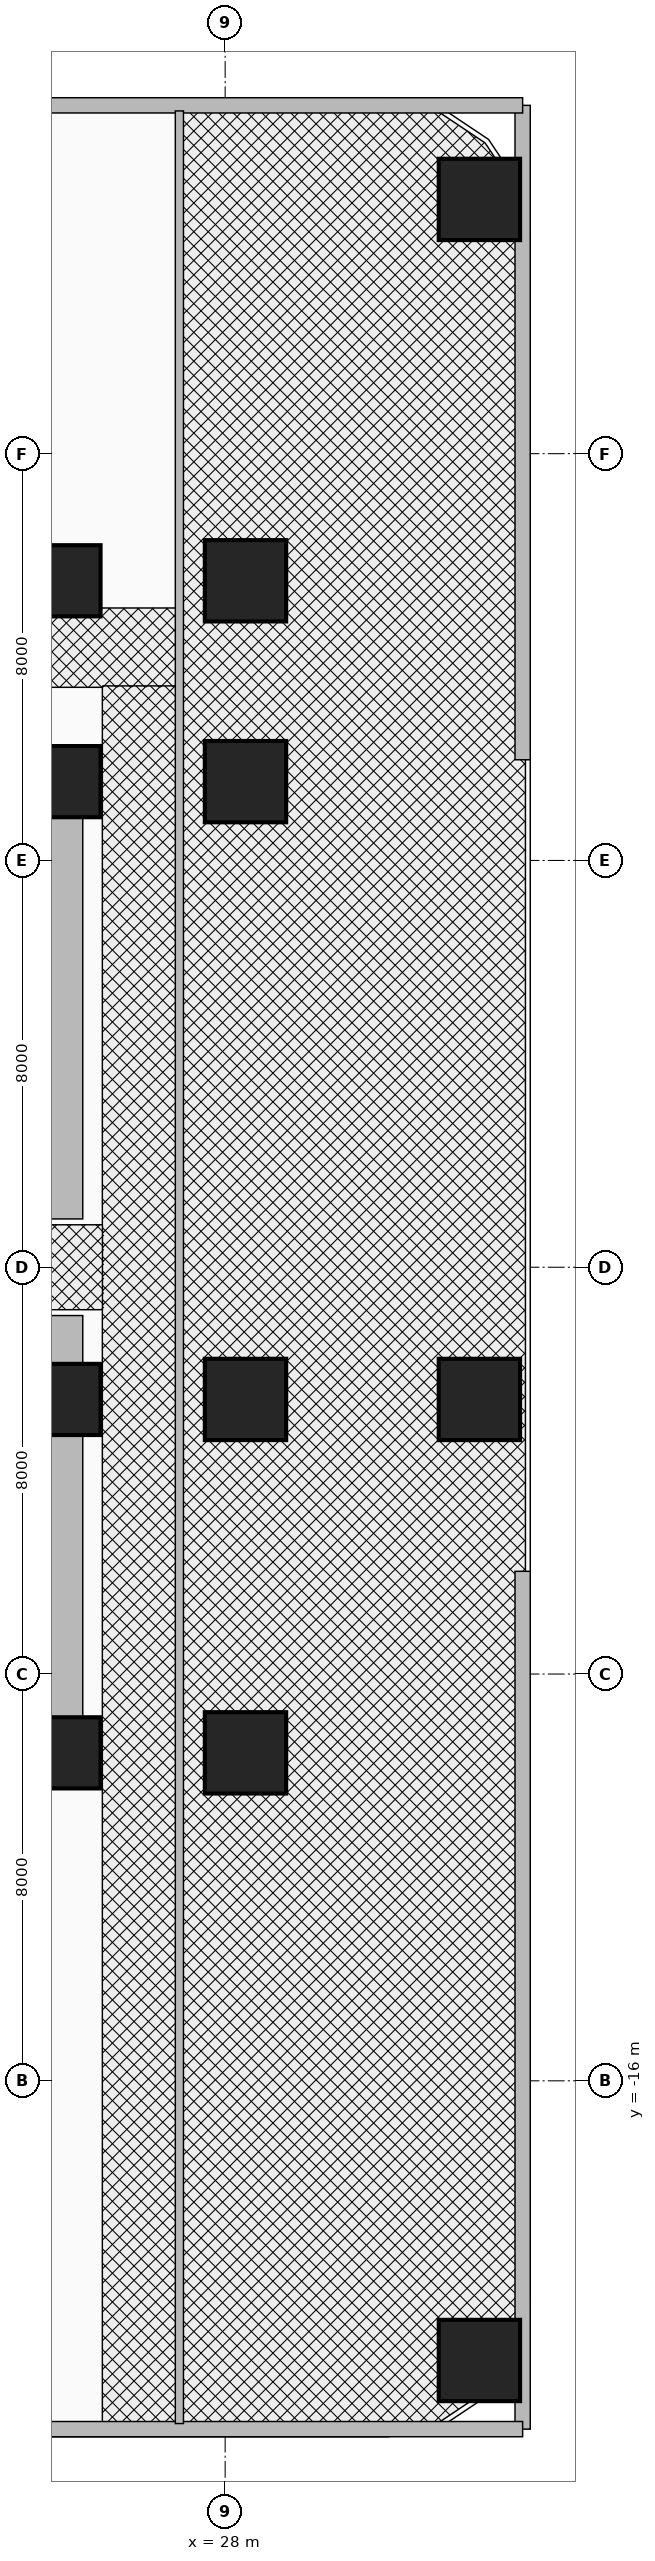
"""IFC4 building model, lengths in metres.
Left out: names, types, materials, properties, quantities, classifications, styles, units other than length and angle.
Written with IfcOpenShell. Run it as: python <this file> out.ifc"""

import sys

from ifc_helpers import new_model, si_unit, direction, frame, frame_2d, origin, origin_2d, place, context, subcontext, project, spatial, rectangle, extrude, source, transform, mapped, element, fill, save


model = new_model("IFC4")
c1 = context("Model", 3, precision=1e-05, world=origin(), true_north=direction((0.0, 1.0)))
c2 = subcontext(c1, "Body", "Model", "MODEL_VIEW")
j1 = project(units=[si_unit("LENGTHUNIT", "METRE"), si_unit("PLANEANGLEUNIT", "RADIAN")], contexts=[c1])
p1 = place(None, origin())
s1 = spatial("IfcSite", under=j1, at=p1, CompositionType="ELEMENT")
p2 = place(p1, origin())
s2 = spatial("IfcBuilding", under=s1, at=p2, CompositionType="ELEMENT")
p3 = place(p2, frame((0.0, 0.0, 10.4)))
s3 = spatial("IfcBuildingStorey", under=s2, at=p3, CompositionType="ELEMENT", Elevation=10.4)
for number, where, z_axis, x_axis in (
    (1, (24.85, -9.9, 0.0), (0.0, 0.0, 1.0), (0.0, 1.0, 0.0)),
    (2, (24.85, 0.95, 0.0), (0.0, 0.0, 1.0), (0.0, 1.0, 0.0)),
):
    element("IfcWall", number, at=place(p3, frame(where, z_axis=z_axis, x_axis=x_axis)), inside=s3, PredefinedType="SHEAR", context=c2, shape_type="SweptSolid", body=[
        extrude(rectangle(XDim=8.95, YDim=0.7, at=frame_2d((4.475, 0.0))), origin(), (0.0, 0.0, 1.0), 4.92),
    ])
for number, where, z_axis, x_axis in (
    (3, (15.85, 9.55, 0.0), (0.0, 0.0, 1.0), (1.0, 0.0, 0.0)),
    (4, (15.85, -9.55, 0.0), (0.0, 0.0, 1.0), (1.0, 0.0, 0.0)),
):
    element("IfcWall", number, at=place(p3, frame(where, z_axis=z_axis, x_axis=x_axis)), inside=s3, PredefinedType="SHEAR", context=c2, shape_type="SweptSolid", body=[
        extrude(rectangle(XDim=9.0, YDim=0.7, at=frame_2d((4.5, 0.0))), origin(), (0.0, 0.0, 1.0), 4.92),
    ])
m1 = source(origin(), c2, "Body", "SweptSolid", [
    extrude(rectangle(XDim=1.4, YDim=1.4, at=origin_2d()), origin(), (0.0, 0.0, 1.0), 5.2),
])
p4 = place(p3, frame((24.85, -9.55, 0.0), z_axis=(0.0, 0.0, 1.0), x_axis=(1.0, 0.0, 0.0)))
e5 = element("IfcColumn", 5, at=p4, inside=s3, PredefinedType="COLUMN", context=c2, shape_type="MappedRepresentation", body=[
    mapped(m1, transform((0.0, 0.0, 0.0), x_axis=(1.0, 0.0, 0.0), y_axis=(0.0, 1.0, 0.0), z_axis=(0.0, 0.0, 1.0), scale=1.0)),
])
m2 = source(origin(), c2, "Body", "SweptSolid", [
    extrude(rectangle(XDim=1.6, YDim=1.6, at=origin_2d()), origin(), (0.0, 0.0, 1.0), 5.2),
])
p5 = place(p3, frame((28.4, -9.55, 0.0), z_axis=(0.0, 0.0, 1.0), x_axis=(1.0, 0.0, 0.0)))
e6 = element("IfcColumn", 6, at=p5, inside=s3, PredefinedType="COLUMN", context=c2, shape_type="MappedRepresentation", body=[
    mapped(m2, transform((0.0, 0.0, 0.0), x_axis=(1.0, 0.0, 0.0), y_axis=(0.0, 1.0, 0.0), z_axis=(0.0, 0.0, 1.0), scale=1.0)),
])
p6 = place(p3, frame((24.85, -2.6, 0.0), z_axis=(0.0, 0.0, 1.0), x_axis=(1.0, 0.0, 0.0)))
e7 = element("IfcColumn", 7, at=p6, inside=s3, PredefinedType="COLUMN", context=c2, shape_type="MappedRepresentation", body=[
    mapped(m1, transform((0.0, 0.0, 0.0), x_axis=(1.0, 0.0, 0.0), y_axis=(0.0, 1.0, 0.0), z_axis=(0.0, 0.0, 1.0), scale=1.0)),
])
p7 = place(p3, frame((28.4, -2.6, 0.0), z_axis=(0.0, 0.0, 1.0), x_axis=(1.0, 0.0, 0.0)))
e8 = element("IfcColumn", 8, at=p7, inside=s3, PredefinedType="COLUMN", context=c2, shape_type="MappedRepresentation", body=[
    mapped(m2, transform((0.0, 0.0, 0.0), x_axis=(1.0, 0.0, 0.0), y_axis=(0.0, 1.0, 0.0), z_axis=(0.0, 0.0, 1.0), scale=1.0)),
])
p8 = place(p3, frame((24.85, 9.55, 0.0), z_axis=(0.0, 0.0, 1.0), x_axis=(1.0, 0.0, 0.0)))
e9 = element("IfcColumn", 9, at=p8, inside=s3, PredefinedType="COLUMN", context=c2, shape_type="MappedRepresentation", body=[
    mapped(m1, transform((0.0, 0.0, 0.0), x_axis=(1.0, 0.0, 0.0), y_axis=(0.0, 1.0, 0.0), z_axis=(0.0, 0.0, 1.0), scale=1.0)),
])
p9 = place(p3, frame((28.4, 9.55, 0.0), z_axis=(0.0, 0.0, 1.0), x_axis=(1.0, 0.0, 0.0)))
e10 = element("IfcColumn", 10, at=p9, inside=s3, PredefinedType="COLUMN", context=c2, shape_type="MappedRepresentation", body=[
    mapped(m2, transform((0.0, 0.0, 0.0), x_axis=(1.0, 0.0, 0.0), y_axis=(0.0, 1.0, 0.0), z_axis=(0.0, 0.0, 1.0), scale=1.0)),
])
p10 = place(p3, frame((24.85, 13.5, 0.0), z_axis=(0.0, 0.0, 1.0), x_axis=(1.0, 0.0, 0.0)))
e11 = element("IfcColumn", 11, at=p10, inside=s3, PredefinedType="COLUMN", context=c2, shape_type="MappedRepresentation", body=[
    mapped(m1, transform((0.0, 0.0, 0.0), x_axis=(1.0, 0.0, 0.0), y_axis=(0.0, 1.0, 0.0), z_axis=(0.0, 0.0, 1.0), scale=1.0)),
])
for number, where, z_axis, x_axis in (
    (12, (28.4, 13.5, 0.0), (0.0, 0.0, 1.0), (1.0, 0.0, 0.0)),
    (13, (33.0, 21.0, 0.0), (0.0, 0.0, 1.0), (1.0, 0.0, 0.0)),
    (14, (33.0, -2.6, 0.0), (0.0, 0.0, 1.0), (1.0, 0.0, 0.0)),
    (15, (33.0, -21.5, 0.0), (0.0, 0.0, 1.0), (1.0, 0.0, 0.0)),
):
    element("IfcColumn", number, at=place(p3, frame(where, z_axis=z_axis, x_axis=x_axis)), inside=s3, PredefinedType="COLUMN", context=c2, shape_type="MappedRepresentation", body=[
        mapped(m2, transform((0.0, 0.0, 0.0), x_axis=(1.0, 0.0, 0.0), y_axis=(0.0, 1.0, 0.0), z_axis=(0.0, 0.0, 1.0), scale=1.0)),
    ])
p11 = place(p3, frame((33.85, -22.85, 0.0), z_axis=(0.0, 0.0, 1.0), x_axis=(0.0, 1.0, 0.0)))
e16 = element("IfcWall", 16, at=p11, inside=s3, PredefinedType="SOLIDWALL", context=c2, shape_type="SweptSolid", body=[
    extrude(rectangle(XDim=16.87, YDim=0.3, at=frame_2d((8.435, 0.0))), origin(), (0.0, 0.0, 1.0), 4.92),
])
p12 = place(p11, frame((3.0, 0.0, 0.9)))
e17 = element("IfcOpeningElement", 17, at=p12, cuts=e16, PredefinedType="OPENING", context=c2, shape_type="SweptSolid", body=[
    extrude(rectangle(XDim=1.5, YDim=1.75, at=frame_2d((0.75, 0.875))), frame((0.0, 0.165, 0.0), z_axis=(0.0, -1.0, 0.0), x_axis=(1.0, 0.0, 0.0)), (0.0, 0.0, 1.0), 0.33),
])
p13 = place(p11, frame((8.2, 0.0, 0.9)))
e18 = element("IfcOpeningElement", 18, at=p13, cuts=e16, PredefinedType="OPENING", context=c2, shape_type="SweptSolid", body=[
    extrude(rectangle(XDim=1.5, YDim=1.75, at=frame_2d((0.75, 0.875))), frame((0.0, 0.165, 0.0), z_axis=(0.0, -1.0, 0.0), x_axis=(1.0, 0.0, 0.0)), (0.0, 0.0, 1.0), 0.33),
])
p14 = place(p11, frame((13.4, 0.0, 0.9)))
e19 = element("IfcOpeningElement", 19, at=p14, cuts=e16, PredefinedType="OPENING", context=c2, shape_type="SweptSolid", body=[
    extrude(rectangle(XDim=1.5, YDim=1.75, at=frame_2d((0.75, 0.875))), frame((0.0, 0.165, 0.0), z_axis=(0.0, -1.0, 0.0), x_axis=(1.0, 0.0, 0.0)), (0.0, 0.0, 1.0), 0.33),
])
p15 = place(p3, frame((33.85, 9.98, 0.0), z_axis=(0.0, 0.0, 1.0), x_axis=(0.0, 1.0, 0.0)))
e20 = element("IfcWall", 20, at=p15, inside=s3, PredefinedType="SOLIDWALL", context=c2, shape_type="SweptSolid", body=[
    extrude(rectangle(XDim=12.87, YDim=0.3, at=frame_2d((6.435, 0.0))), origin(), (0.0, 0.0, 1.0), 4.92),
])
p16 = place(p15, frame((3.0, 0.0, 0.9)))
e21 = element("IfcOpeningElement", 21, at=p16, cuts=e20, PredefinedType="OPENING", context=c2, shape_type="SweptSolid", body=[
    extrude(rectangle(XDim=1.5, YDim=1.75, at=frame_2d((0.75, 0.875))), frame((0.0, 0.165, 0.0), z_axis=(0.0, -1.0, 0.0), x_axis=(1.0, 0.0, 0.0)), (0.0, 0.0, 1.0), 0.33),
])
p17 = place(p15, frame((8.2, 0.0, 0.9)))
e22 = element("IfcOpeningElement", 22, at=p17, cuts=e20, PredefinedType="OPENING", context=c2, shape_type="SweptSolid", body=[
    extrude(rectangle(XDim=1.5, YDim=1.75, at=frame_2d((0.75, 0.875))), frame((0.0, 0.165, 0.0), z_axis=(0.0, -1.0, 0.0), x_axis=(1.0, 0.0, 0.0)), (0.0, 0.0, 1.0), 0.33),
])
p18 = place(p3, frame((12.15, -22.85, 0.0), z_axis=(0.0, 0.0, 1.0), x_axis=(1.0, 0.0, 0.0)))
e23 = element("IfcWall", 23, at=p18, inside=s3, PredefinedType="SOLIDWALL", context=c2, shape_type="SweptSolid", body=[
    extrude(rectangle(XDim=21.7, YDim=0.3, at=frame_2d((10.85, 0.0))), origin(), (0.0, 0.0, 1.0), 4.92),
])
p19 = place(p18, frame((3.2, 0.0, 0.9)))
e24 = element("IfcOpeningElement", 24, at=p19, cuts=e23, PredefinedType="OPENING", context=c2, shape_type="SweptSolid", body=[
    extrude(rectangle(XDim=1.5, YDim=1.75, at=frame_2d((0.75, 0.875))), frame((0.0, 0.165, 0.0), z_axis=(0.0, -1.0, 0.0), x_axis=(1.0, 0.0, 0.0)), (0.0, 0.0, 1.0), 0.33),
])
p20 = place(p18, frame((9.8, 0.0, 0.9)))
e25 = element("IfcOpeningElement", 25, at=p20, cuts=e23, PredefinedType="OPENING", context=c2, shape_type="SweptSolid", body=[
    extrude(rectangle(XDim=1.5, YDim=1.75, at=frame_2d((0.75, 0.875))), frame((0.0, 0.165, 0.0), z_axis=(0.0, -1.0, 0.0), x_axis=(1.0, 0.0, 0.0)), (0.0, 0.0, 1.0), 0.33),
])
p21 = place(p18, frame((17.6, 0.0, 0.9)))
e26 = element("IfcOpeningElement", 26, at=p21, cuts=e23, PredefinedType="OPENING", context=c2, shape_type="SweptSolid", body=[
    extrude(rectangle(XDim=1.5, YDim=1.75, at=frame_2d((0.75, 0.875))), frame((0.0, 0.165, 0.0), z_axis=(0.0, -1.0, 0.0), x_axis=(1.0, 0.0, 0.0)), (0.0, 0.0, 1.0), 0.33),
])
p22 = place(p3, frame((9.98, 22.85, 0.0), z_axis=(0.0, 0.0, 1.0), x_axis=(1.0, 0.0, 0.0)))
e27 = element("IfcWall", 27, at=p22, inside=s3, PredefinedType="SOLIDWALL", context=c2, shape_type="SweptSolid", body=[
    extrude(rectangle(XDim=23.87, YDim=0.3, at=frame_2d((11.935, 0.0))), origin(), (0.0, 0.0, 1.0), 4.92),
])
p23 = place(p22, frame((3.2, 0.0, 0.9)))
e28 = element("IfcOpeningElement", 28, at=p23, cuts=e27, PredefinedType="OPENING", context=c2, shape_type="SweptSolid", body=[
    extrude(rectangle(XDim=1.5, YDim=1.75, at=frame_2d((0.75, 0.875))), frame((0.0, 0.165, 0.0), z_axis=(0.0, -1.0, 0.0), x_axis=(1.0, 0.0, 0.0)), (0.0, 0.0, 1.0), 0.33),
])
p24 = place(p22, frame((10.0, 0.0, 0.9)))
e29 = element("IfcOpeningElement", 29, at=p24, cuts=e27, PredefinedType="OPENING", context=c2, shape_type="SweptSolid", body=[
    extrude(rectangle(XDim=1.5, YDim=1.75, at=frame_2d((0.75, 0.875))), frame((0.0, 0.165, 0.0), z_axis=(0.0, -1.0, 0.0), x_axis=(1.0, 0.0, 0.0)), (0.0, 0.0, 1.0), 0.33),
])
p25 = place(p22, frame((17.8, 0.0, 0.9)))
e30 = element("IfcOpeningElement", 30, at=p25, cuts=e27, PredefinedType="OPENING", context=c2, shape_type="SweptSolid", body=[
    extrude(rectangle(XDim=1.5, YDim=1.75, at=frame_2d((0.75, 0.875))), frame((0.0, 0.165, 0.0), z_axis=(0.0, -1.0, 0.0), x_axis=(1.0, 0.0, 0.0)), (0.0, 0.0, 1.0), 0.33),
])
p26 = place(p3, frame((27.1, -22.74, 0.0), z_axis=(0.0, 0.0, 1.0), x_axis=(0.0, 1.0, 0.0)))
e31 = element("IfcWall", 31, at=p26, inside=s3, PredefinedType="PARTITIONING", context=c2, shape_type="SweptSolid", body=[
    extrude(rectangle(XDim=45.48, YDim=0.16, at=frame_2d((22.74, 0.0))), origin(), (0.0, 0.0, 1.0), 3.957),
])
p27 = place(p26, frame((7.0, 0.0, 0.0)))
e32 = element("IfcOpeningElement", 32, at=p27, cuts=e31, PredefinedType="OPENING", context=c2, shape_type="SweptSolid", body=[
    extrude(rectangle(XDim=1.8, YDim=2.15, at=frame_2d((0.9, 1.075))), frame((0.0, 0.095, 0.0), z_axis=(0.0, -1.0, 0.0), x_axis=(1.0, 0.0, 0.0)), (0.0, 0.0, 1.0), 0.19),
])
p28 = place(p26, frame((25.0, 0.0, 0.0)))
e33 = element("IfcOpeningElement", 33, at=p28, cuts=e31, PredefinedType="OPENING", context=c2, shape_type="SweptSolid", body=[
    extrude(rectangle(XDim=1.8, YDim=2.15, at=frame_2d((0.9, 1.075))), frame((0.0, 0.095, 0.0), z_axis=(0.0, -1.0, 0.0), x_axis=(1.0, 0.0, 0.0)), (0.0, 0.0, 1.0), 0.19),
])
p29 = place(p12, origin())
e34 = element("IfcWindow", 34, at=p29, inside=s3, PartitioningType="SINGLE_PANEL", PredefinedType="WINDOW", context=c2, shape_type="SweptSolid", body=[
    extrude(rectangle(XDim=1.5, YDim=1.75, at=frame_2d((0.75, 0.875))), frame((0.0, 0.03, 0.0), z_axis=(0.0, -1.0, 0.0), x_axis=(1.0, 0.0, 0.0)), (0.0, 0.0, 1.0), 0.06),
])
fill(e17, e34)
p30 = place(p13, origin())
e35 = element("IfcWindow", 35, at=p30, inside=s3, PartitioningType="SINGLE_PANEL", PredefinedType="WINDOW", context=c2, shape_type="SweptSolid", body=[
    extrude(rectangle(XDim=1.5, YDim=1.75, at=frame_2d((0.75, 0.875))), frame((0.0, 0.03, 0.0), z_axis=(0.0, -1.0, 0.0), x_axis=(1.0, 0.0, 0.0)), (0.0, 0.0, 1.0), 0.06),
])
fill(e18, e35)
p31 = place(p14, origin())
e36 = element("IfcWindow", 36, at=p31, inside=s3, PartitioningType="SINGLE_PANEL", PredefinedType="WINDOW", context=c2, shape_type="SweptSolid", body=[
    extrude(rectangle(XDim=1.5, YDim=1.75, at=frame_2d((0.75, 0.875))), frame((0.0, 0.03, 0.0), z_axis=(0.0, -1.0, 0.0), x_axis=(1.0, 0.0, 0.0)), (0.0, 0.0, 1.0), 0.06),
])
fill(e19, e36)
p32 = place(p16, origin())
e37 = element("IfcWindow", 37, at=p32, inside=s3, PartitioningType="SINGLE_PANEL", PredefinedType="WINDOW", context=c2, shape_type="SweptSolid", body=[
    extrude(rectangle(XDim=1.5, YDim=1.75, at=frame_2d((0.75, 0.875))), frame((0.0, 0.03, 0.0), z_axis=(0.0, -1.0, 0.0), x_axis=(1.0, 0.0, 0.0)), (0.0, 0.0, 1.0), 0.06),
])
fill(e21, e37)
p33 = place(p17, origin())
e38 = element("IfcWindow", 38, at=p33, inside=s3, PartitioningType="SINGLE_PANEL", PredefinedType="WINDOW", context=c2, shape_type="SweptSolid", body=[
    extrude(rectangle(XDim=1.5, YDim=1.75, at=frame_2d((0.75, 0.875))), frame((0.0, 0.03, 0.0), z_axis=(0.0, -1.0, 0.0), x_axis=(1.0, 0.0, 0.0)), (0.0, 0.0, 1.0), 0.06),
])
fill(e22, e38)
p34 = place(p21, origin())
e39 = element("IfcWindow", 39, at=p34, inside=s3, PartitioningType="SINGLE_PANEL", PredefinedType="WINDOW", context=c2, shape_type="SweptSolid", body=[
    extrude(rectangle(XDim=1.5, YDim=1.75, at=frame_2d((0.75, 0.875))), frame((0.0, 0.03, 0.0), z_axis=(0.0, -1.0, 0.0), x_axis=(1.0, 0.0, 0.0)), (0.0, 0.0, 1.0), 0.06),
])
fill(e26, e39)
p35 = place(p25, origin())
e40 = element("IfcWindow", 40, at=p35, inside=s3, PartitioningType="SINGLE_PANEL", PredefinedType="WINDOW", context=c2, shape_type="SweptSolid", body=[
    extrude(rectangle(XDim=1.5, YDim=1.75, at=frame_2d((0.75, 0.875))), frame((0.0, 0.03, 0.0), z_axis=(0.0, -1.0, 0.0), x_axis=(1.0, 0.0, 0.0)), (0.0, 0.0, 1.0), 0.06),
])
fill(e30, e40)
p36 = place(p27, origin())
e41 = element("IfcDoor", 41, at=p36, inside=s3, OperationType="DOUBLE_DOOR_SINGLE_SWING", PredefinedType="DOOR", context=c2, shape_type="SweptSolid", body=[
    extrude(rectangle(XDim=1.8, YDim=2.15, at=frame_2d((0.9, 1.075))), frame((0.0, 0.025, 0.0), z_axis=(0.0, -1.0, 0.0), x_axis=(1.0, 0.0, 0.0)), (0.0, 0.0, 1.0), 0.05),
])
fill(e32, e41)
p37 = place(p28, frame((1.8, 0.0, 0.0), z_axis=(0.0, 0.0, 1.0), x_axis=(-1.0, 0.0, 0.0)))
e42 = element("IfcDoor", 42, at=p37, inside=s3, OperationType="DOUBLE_DOOR_SINGLE_SWING", PredefinedType="DOOR", context=c2, shape_type="SweptSolid", body=[
    extrude(rectangle(XDim=1.8, YDim=2.15, at=frame_2d((0.9, 1.075))), frame((0.0, 0.025, 0.0), z_axis=(0.0, -1.0, 0.0), x_axis=(1.0, 0.0, 0.0)), (0.0, 0.0, 1.0), 0.05),
])
fill(e33, e42)
save(model, sys.argv[1])
